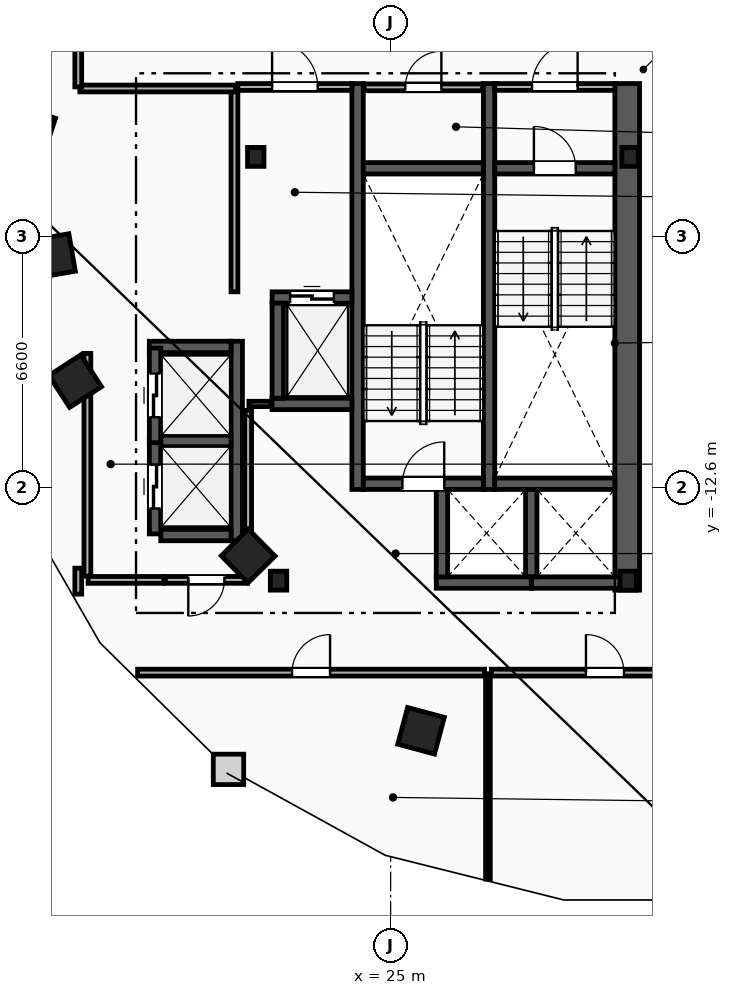
"""IFC4 building model, lengths in metres.
Left out: names, types, materials, properties, quantities, classifications, styles, units other than length and angle.
Written with IfcOpenShell. Run it as: python <this file> out.ifc"""

import sys

from ifc_helpers import new_model, si_unit, direction, frame, frame_2d, origin, origin_2d, place, context, subcontext, project, spatial, rectangle, i_section, extrude, element, fill, save


model = new_model("IFC4")
c1 = context("Model", 3, precision=1e-05, world=origin(), true_north=direction((0.0, 1.0)))
c2 = subcontext(c1, "Body", "Model", "MODEL_VIEW")
j1 = project(units=[si_unit("LENGTHUNIT", "METRE"), si_unit("PLANEANGLEUNIT", "RADIAN")], contexts=[c1])
p1 = place(None, origin())
s1 = spatial("IfcSite", under=j1, at=p1, CompositionType="ELEMENT")
p2 = place(p1, origin())
s2 = spatial("IfcBuilding", under=s1, at=p2, CompositionType="ELEMENT")
p3 = place(p2, frame((0.0, 0.0, 147.6)))
s3 = spatial("IfcBuildingStorey", under=s2, at=p3, CompositionType="ELEMENT", Elevation=147.6)
for number, where, z_axis, x_axis in (
    (1, (31.3, -3.9, 0.0), (0.0, 0.0, 1.0), (1.0, 0.0, 0.0)),
    (2, (21.45, -3.9, 0.0), (0.0, 0.0, 1.0), (1.0, 0.0, 0.0)),
    (3, (22.05, -15.05, 0.0), (0.0, 0.0, 1.0), (1.0, 0.0, 0.0)),
    (4, (31.25, -15.05, 0.0), (0.0, 0.0, 1.0), (1.0, 0.0, 0.0)),
):
    element("IfcColumn", number, at=place(p3, frame(where, z_axis=z_axis, x_axis=x_axis)), inside=s3, PredefinedType="COLUMN", context=c2, shape_type="SweptSolid", body=[
        extrude(i_section(OverallWidth=0.432, OverallDepth=0.498, WebThickness=0.056, FlangeThickness=0.089, FilletRadius=0.018, at=origin_2d()), origin(), (0.0, 0.0, 1.0), 3.6),
    ])
for number, where, z_axis, x_axis in (
    (5, (15.55, -3.2, 0.0), (0.0, 0.0, 1.0), (-0.315, -0.949, 0.0)),
    (6, (16.125, -6.5, 0.0), (0.0, 0.0, 1.0), (0.172, -0.985, 0.0)),
    (7, (16.7, -9.8, 0.0), (0.0, 0.0, 1.0), (0.544, -0.839, 0.0)),
    (8, (21.25, -14.4, 0.0), (0.0, 0.0, 1.0), (0.703, -0.711, 0.0)),
    (9, (25.8, -19.0, 0.0), (0.0, 0.0, 1.0), (0.966, -0.259, 0.0)),
):
    element("IfcColumn", number, at=place(p3, frame(where, z_axis=z_axis, x_axis=x_axis)), inside=s3, PredefinedType="COLUMN", context=c2, shape_type="SweptSolid", body=[
        extrude(rectangle(XDim=1.0, YDim=1.0, at=origin_2d()), origin(), (0.0, 0.0, 1.0), 3.6),
    ])
p4 = place(p3, frame((31.225, -15.3, 0.0), z_axis=(0.0, 0.0, 1.0), x_axis=(0.0, 1.0, 0.0)))
e10 = element("IfcWall", 10, at=p4, inside=s3, PredefinedType="SHEAR", context=c2, shape_type="SweptSolid", body=[
    extrude(rectangle(XDim=13.33, YDim=0.65, at=frame_2d((6.665, 0.0))), origin(), (0.0, 0.0, 1.0), 3.36),
])
for number, where, z_axis, x_axis in (
    (11, (27.59, -12.65, 0.0), (0.0, 0.0, 1.0), (0.0, 1.0, 0.0)),
    (12, (24.13, -12.65, 0.0), (0.0, 0.0, 1.0), (0.0, 1.0, 0.0)),
):
    element("IfcWall", number, at=place(p3, frame(where, z_axis=z_axis, x_axis=x_axis)), inside=s3, PredefinedType="SHEAR", context=c2, shape_type="SweptSolid", body=[
        extrude(rectangle(XDim=10.68, YDim=0.3, at=frame_2d((5.34, 0.0))), origin(), (0.0, 0.0, 1.0), 3.36),
    ])
p5 = place(p3, frame((27.74, -4.2, 0.0), z_axis=(0.0, 0.0, 1.0), x_axis=(1.0, 0.0, 0.0)))
e13 = element("IfcWall", 13, at=p5, inside=s3, PredefinedType="SHEAR", context=c2, shape_type="SweptSolid", body=[
    extrude(rectangle(XDim=3.16, YDim=0.3, at=frame_2d((1.58, 0.0))), origin(), (0.0, 0.0, 1.0), 3.36),
])
p6 = place(p5, frame((1.03, 0.0, 0.0)))
e14 = element("IfcOpeningElement", 14, at=p6, cuts=e13, PredefinedType="OPENING", context=c2, shape_type="SweptSolid", body=[
    extrude(rectangle(XDim=1.1, YDim=2.15, at=frame_2d((0.55, 1.075))), frame((0.0, 0.16, 0.0), z_axis=(0.0, -1.0, 0.0), x_axis=(1.0, 0.0, 0.0)), (0.0, 0.0, 1.0), 0.32),
])
p7 = place(p3, frame((27.74, -12.5, 0.0), z_axis=(0.0, 0.0, 1.0), x_axis=(1.0, 0.0, 0.0)))
e15 = element("IfcWall", 15, at=p7, inside=s3, PredefinedType="SHEAR", context=c2, shape_type="SweptSolid", body=[
    extrude(rectangle(XDim=3.16, YDim=0.3, at=frame_2d((1.58, 0.0))), origin(), (0.0, 0.0, 1.0), 3.36),
])
p8 = place(p3, frame((24.28, -12.5, 0.0), z_axis=(0.0, 0.0, 1.0), x_axis=(1.0, 0.0, 0.0)))
e16 = element("IfcWall", 16, at=p8, inside=s3, PredefinedType="SHEAR", context=c2, shape_type="SweptSolid", body=[
    extrude(rectangle(XDim=3.16, YDim=0.3, at=frame_2d((1.58, 0.0))), origin(), (0.0, 0.0, 1.0), 3.36),
])
p9 = place(p8, frame((1.03, 0.0, 0.0)))
e17 = element("IfcOpeningElement", 17, at=p9, cuts=e16, PredefinedType="OPENING", context=c2, shape_type="SweptSolid", body=[
    extrude(rectangle(XDim=1.1, YDim=2.15, at=frame_2d((0.55, 1.075))), frame((0.0, 0.16, 0.0), z_axis=(0.0, -1.0, 0.0), x_axis=(1.0, 0.0, 0.0)), (0.0, 0.0, 1.0), 0.32),
])
p10 = place(p3, frame((24.28, -4.2, 0.0), z_axis=(0.0, 0.0, 1.0), x_axis=(1.0, 0.0, 0.0)))
e18 = element("IfcWall", 18, at=p10, inside=s3, PredefinedType="SHEAR", context=c2, shape_type="SweptSolid", body=[
    extrude(rectangle(XDim=3.16, YDim=0.3, at=frame_2d((1.58, 0.0))), origin(), (0.0, 0.0, 1.0), 3.36),
])
p11 = place(p3, frame((20.89, -7.45, 0.0), z_axis=(0.0, 0.0, 1.0), x_axis=(0.0, 1.0, 0.0)))
e19 = element("IfcWall", 19, at=p11, inside=s3, PredefinedType="PARTITIONING", context=c2, shape_type="SweptSolid", body=[
    extrude(rectangle(XDim=5.3, YDim=0.18, at=frame_2d((2.65, 0.0))), origin(), (0.0, 0.0, 1.0), 3.36),
])
p12 = place(p3, frame((20.98, -2.06, 0.0), z_axis=(0.0, 0.0, 1.0), x_axis=(1.0, 0.0, 0.0)))
e20 = element("IfcWall", 20, at=p12, inside=s3, PredefinedType="PARTITIONING", context=c2, shape_type="SweptSolid", body=[
    extrude(rectangle(XDim=3.0, YDim=0.18, at=frame_2d((1.5, 0.0))), origin(), (0.0, 0.0, 1.0), 3.36),
])
p13 = place(p12, frame((0.9, 0.0, 0.0)))
e21 = element("IfcOpeningElement", 21, at=p13, cuts=e20, PredefinedType="OPENING", context=c2, shape_type="SweptSolid", body=[
    extrude(rectangle(XDim=1.2, YDim=2.15, at=frame_2d((0.6, 1.075))), frame((0.0, 0.1, 0.0), z_axis=(0.0, -1.0, 0.0), x_axis=(1.0, 0.0, 0.0)), (0.0, 0.0, 1.0), 0.2),
])
p14 = place(p3, frame((27.74, -2.06, 0.0), z_axis=(0.0, 0.0, 1.0), x_axis=(1.0, 0.0, 0.0)))
e22 = element("IfcWall", 22, at=p14, inside=s3, PredefinedType="PARTITIONING", context=c2, shape_type="SweptSolid", body=[
    extrude(rectangle(XDim=3.16, YDim=0.18, at=frame_2d((1.58, 0.0))), origin(), (0.0, 0.0, 1.0), 3.36),
])
p15 = place(p14, frame((0.98, 0.0, 0.0)))
e23 = element("IfcOpeningElement", 23, at=p15, cuts=e22, PredefinedType="OPENING", context=c2, shape_type="SweptSolid", body=[
    extrude(rectangle(XDim=1.2, YDim=2.15, at=frame_2d((0.6, 1.075))), frame((0.0, 0.1, 0.0), z_axis=(0.0, -1.0, 0.0), x_axis=(1.0, 0.0, 0.0)), (0.0, 0.0, 1.0), 0.2),
])
p16 = place(p3, frame((21.88, -7.6, 0.0), z_axis=(0.0, 0.0, 1.0), x_axis=(1.0, 0.0, 0.0)))
e24 = element("IfcWall", 24, at=p16, inside=s3, PredefinedType="SHEAR", context=c2, shape_type="SweptSolid", body=[
    extrude(rectangle(XDim=2.1, YDim=0.3, at=frame_2d((1.05, 0.0))), origin(), (0.0, 0.0, 1.0), 3.36),
])
p17 = place(p16, frame((0.475, 0.0, 0.0)))
e25 = element("IfcOpeningElement", 25, at=p17, cuts=e24, PredefinedType="OPENING", context=c2, shape_type="SweptSolid", body=[
    extrude(rectangle(XDim=1.15, YDim=2.2, at=frame_2d((0.575, 1.1))), frame((0.0, 0.16, 0.0), z_axis=(0.0, -1.0, 0.0), x_axis=(1.0, 0.0, 0.0)), (0.0, 0.0, 1.0), 0.32),
])
p18 = place(p3, frame((21.88, -10.4, 0.0), z_axis=(0.0, 0.0, 1.0), x_axis=(1.0, 0.0, 0.0)))
e26 = element("IfcWall", 26, at=p18, inside=s3, PredefinedType="SHEAR", context=c2, shape_type="SweptSolid", body=[
    extrude(rectangle(XDim=2.1, YDim=0.3, at=frame_2d((1.05, 0.0))), origin(), (0.0, 0.0, 1.0), 3.36),
])
for number, where, z_axis, x_axis in (
    (27, (22.03, -10.25, 0.0), (0.0, 0.0, 1.0), (0.0, 1.0, 0.0)),
    (28, (28.7, -15.1, 0.0), (0.0, 0.0, 1.0), (1.0, 0.0, 0.0)),
):
    element("IfcWall", number, at=place(p3, frame(where, z_axis=z_axis, x_axis=x_axis)), inside=s3, PredefinedType="SHEAR", context=c2, shape_type="SweptSolid", body=[
        extrude(rectangle(XDim=2.5, YDim=0.3, at=frame_2d((1.25, 0.0))), origin(), (0.0, 0.0, 1.0), 3.36),
    ])
p19 = place(p3, frame((28.7, -14.95, 0.0), z_axis=(0.0, 0.0, 1.0), x_axis=(0.0, 1.0, 0.0)))
e29 = element("IfcWall", 29, at=p19, inside=s3, PredefinedType="SHEAR", context=c2, shape_type="SweptSolid", body=[
    extrude(rectangle(XDim=2.3, YDim=0.3, at=frame_2d((1.15, 0.0))), origin(), (0.0, 0.0, 1.0), 3.36),
])
p20 = place(p3, frame((26.2, -15.1, 0.0), z_axis=(0.0, 0.0, 1.0), x_axis=(1.0, 0.0, 0.0)))
e30 = element("IfcWall", 30, at=p20, inside=s3, PredefinedType="SHEAR", context=c2, shape_type="SweptSolid", body=[
    extrude(rectangle(XDim=2.5, YDim=0.3, at=frame_2d((1.25, 0.0))), origin(), (0.0, 0.0, 1.0), 3.36),
])
p21 = place(p3, frame((26.35, -14.95, 0.0), z_axis=(0.0, 0.0, 1.0), x_axis=(0.0, 1.0, 0.0)))
e31 = element("IfcWall", 31, at=p21, inside=s3, PredefinedType="SHEAR", context=c2, shape_type="SweptSolid", body=[
    extrude(rectangle(XDim=2.3, YDim=0.3, at=frame_2d((1.15, 0.0))), origin(), (0.0, 0.0, 1.0), 3.36),
])
p22 = place(p3, frame((20.95, -14.0, 0.0), z_axis=(0.0, 0.0, 1.0), x_axis=(0.0, 1.0, 0.0)))
e32 = element("IfcWall", 32, at=p22, inside=s3, PredefinedType="SHEAR", context=c2, shape_type="SweptSolid", body=[
    extrude(rectangle(XDim=5.25, YDim=0.3, at=frame_2d((2.625, 0.0))), origin(), (0.0, 0.0, 1.0), 3.36),
])
p23 = place(p3, frame((18.95, -13.85, 0.0), z_axis=(0.0, 0.0, 1.0), x_axis=(1.0, 0.0, 0.0)))
e33 = element("IfcWall", 33, at=p23, inside=s3, PredefinedType="SHEAR", context=c2, shape_type="SweptSolid", body=[
    extrude(rectangle(XDim=1.85, YDim=0.3, at=frame_2d((0.925, 0.0))), origin(), (0.0, 0.0, 1.0), 3.36),
])
p24 = place(p3, frame((18.65, -8.9, 0.0), z_axis=(0.0, 0.0, 1.0), x_axis=(1.0, 0.0, 0.0)))
e34 = element("IfcWall", 34, at=p24, inside=s3, PredefinedType="SHEAR", context=c2, shape_type="SweptSolid", body=[
    extrude(rectangle(XDim=2.15, YDim=0.3, at=frame_2d((1.075, 0.0))), origin(), (0.0, 0.0, 1.0), 3.36),
])
p25 = place(p3, frame((18.95, -11.375, 0.0), z_axis=(0.0, 0.0, 1.0), x_axis=(1.0, 0.0, 0.0)))
e35 = element("IfcWall", 35, at=p25, inside=s3, PredefinedType="SHEAR", context=c2, shape_type="SweptSolid", body=[
    extrude(rectangle(XDim=1.85, YDim=0.3, at=frame_2d((0.925, 0.0))), origin(), (0.0, 0.0, 1.0), 3.36),
])
p26 = place(p3, frame((18.8, -13.82, 0.0), z_axis=(0.0, 0.0, 1.0), x_axis=(0.0, 1.0, 0.0)))
e36 = element("IfcWall", 36, at=p26, inside=s3, PredefinedType="SHEAR", context=c2, shape_type="SweptSolid", body=[
    extrude(rectangle(XDim=2.49, YDim=0.3, at=frame_2d((1.245, 0.0))), origin(), (0.0, 0.0, 1.0), 3.36),
])
p27 = place(p26, frame((0.67, 0.0, 0.0)))
e37 = element("IfcOpeningElement", 37, at=p27, cuts=e36, PredefinedType="OPENING", context=c2, shape_type="SweptSolid", body=[
    extrude(rectangle(XDim=1.15, YDim=2.2, at=frame_2d((0.575, 1.1))), frame((0.0, 0.16, 0.0), z_axis=(0.0, -1.0, 0.0), x_axis=(1.0, 0.0, 0.0)), (0.0, 0.0, 1.0), 0.32),
])
p28 = place(p3, frame((18.8, -11.42, 0.0), z_axis=(0.0, 0.0, 1.0), x_axis=(0.0, 1.0, 0.0)))
e38 = element("IfcWall", 38, at=p28, inside=s3, PredefinedType="SHEAR", context=c2, shape_type="SweptSolid", body=[
    extrude(rectangle(XDim=2.49, YDim=0.3, at=frame_2d((1.245, 0.0))), origin(), (0.0, 0.0, 1.0), 3.36),
])
p29 = place(p28, frame((0.67, 0.0, 0.0)))
e39 = element("IfcOpeningElement", 39, at=p29, cuts=e38, PredefinedType="OPENING", context=c2, shape_type="SweptSolid", body=[
    extrude(rectangle(XDim=1.15, YDim=2.2, at=frame_2d((0.575, 1.1))), frame((0.0, 0.16, 0.0), z_axis=(0.0, -1.0, 0.0), x_axis=(1.0, 0.0, 0.0)), (0.0, 0.0, 1.0), 0.32),
])
p30 = place(p3, frame((17.02, -14.93, 0.0), z_axis=(0.0, 0.0, 1.0), x_axis=(0.0, 1.0, 0.0)))
e40 = element("IfcWall", 40, at=p30, inside=s3, PredefinedType="PARTITIONING", context=c2, shape_type="SweptSolid", body=[
    extrude(rectangle(XDim=5.86, YDim=0.18, at=frame_2d((2.93, 0.0))), origin(), (0.0, 0.0, 1.0), 3.36),
])
p31 = place(p3, frame((17.04, -15.03, 0.0), z_axis=(0.0, 0.0, 1.0), x_axis=(1.0, 0.0, 0.0)))
e41 = element("IfcWall", 41, at=p31, inside=s3, PredefinedType="PARTITIONING", context=c2, shape_type="SweptSolid", body=[
    extrude(rectangle(XDim=1.99, YDim=0.18, at=frame_2d((0.995, 0.0))), origin(), (0.0, 0.0, 1.0), 3.36),
])
p32 = place(p3, frame((21.23, -15.03, 0.0), z_axis=(0.0, 0.0, 1.0), x_axis=(-1.0, 0.0, 0.0)))
e42 = element("IfcWall", 42, at=p32, inside=s3, PredefinedType="PARTITIONING", context=c2, shape_type="SweptSolid", body=[
    extrude(rectangle(XDim=2.16, YDim=0.18, at=frame_2d((1.08, 0.0))), origin(), (0.0, 0.0, 1.0), 3.36),
])
p33 = place(p32, frame((0.605, 0.0, 0.0)))
e43 = element("IfcOpeningElement", 43, at=p33, cuts=e42, PredefinedType="OPENING", context=c2, shape_type="SweptSolid", body=[
    extrude(rectangle(XDim=0.95, YDim=2.1, at=frame_2d((0.475, 1.05))), frame((0.0, 0.1, 0.0), z_axis=(0.0, -1.0, 0.0), x_axis=(1.0, 0.0, 0.0)), (0.0, 0.0, 1.0), 0.2),
])
p34 = place(p3, frame((21.27, -10.4, 0.0), z_axis=(0.0, 0.0, 1.0), x_axis=(1.0, 0.0, 0.0)))
e44 = element("IfcWall", 44, at=p34, inside=s3, PredefinedType="PARTITIONING", context=c2, shape_type="SweptSolid", body=[
    extrude(rectangle(XDim=0.59, YDim=0.14, at=frame_2d((0.295, 0.0))), origin(), (0.0, 0.0, 1.0), 3.36),
])
p35 = place(p3, frame((21.25, -14.93, 0.0), z_axis=(0.0, 0.0, 1.0), x_axis=(0.0, 1.0, 0.0)))
e45 = element("IfcWall", 45, at=p35, inside=s3, PredefinedType="PARTITIONING", context=c2, shape_type="SweptSolid", body=[
    extrude(rectangle(XDim=4.36, YDim=0.18, at=frame_2d((2.18, 0.0))), origin(), (0.0, 0.0, 1.0), 3.36),
])
p36 = place(p3, frame((24.3, -2.07, 0.0), z_axis=(0.0, 0.0, 1.0), x_axis=(1.0, 0.0, 0.0)))
e46 = element("IfcWall", 46, at=p36, inside=s3, PredefinedType="PARTITIONING", context=c2, shape_type="SweptSolid", body=[
    extrude(rectangle(XDim=3.12, YDim=0.18, at=frame_2d((1.56, 0.0))), origin(), (0.0, 0.0, 1.0), 3.36),
])
p37 = place(p36, frame((1.085, 0.0, 0.0)))
e47 = element("IfcOpeningElement", 47, at=p37, cuts=e46, PredefinedType="OPENING", context=c2, shape_type="SweptSolid", body=[
    extrude(rectangle(XDim=0.95, YDim=2.1, at=frame_2d((0.475, 1.05))), frame((0.0, 0.1, 0.0), z_axis=(0.0, -1.0, 0.0), x_axis=(1.0, 0.0, 0.0)), (0.0, 0.0, 1.0), 0.2),
])
p38 = place(p3, frame((27.56, -22.901, 0.0), z_axis=(0.0, 0.0, 1.0), x_axis=(0.0, 1.0, 0.0)))
e48 = element("IfcWall", 48, at=p38, inside=s3, PredefinedType="PARTITIONING", context=c2, shape_type="SweptSolid", body=[
    extrude(rectangle(XDim=5.401, YDim=0.125, at=frame_2d((2.701, 0.0))), origin(), (0.0, 0.0, 1.0), 3.36),
])
p39 = place(p3, frame((18.342, -17.47, 0.0), z_axis=(0.0, 0.0, 1.0), x_axis=(1.0, 0.0, 0.0)))
e49 = element("IfcWall", 49, at=p39, inside=s3, PredefinedType="PARTITIONING", context=c2, shape_type="SweptSolid", body=[
    extrude(rectangle(XDim=9.128, YDim=0.18, at=frame_2d((4.564, 0.0))), origin(), (0.0, 0.0, 1.0), 3.36),
])
p40 = place(p39, frame((4.064, 0.0, 0.0)))
e50 = element("IfcOpeningElement", 50, at=p40, cuts=e49, PredefinedType="OPENING", context=c2, shape_type="SweptSolid", body=[
    extrude(rectangle(XDim=1.0, YDim=2.15, at=frame_2d((0.5, 1.075))), frame((0.0, 0.1, 0.0), z_axis=(0.0, -1.0, 0.0), x_axis=(1.0, 0.0, 0.0)), (0.0, 0.0, 1.0), 0.2),
])
p41 = place(p3, frame((27.65, -17.47, 0.0), z_axis=(0.0, 0.0, 1.0), x_axis=(1.0, 0.0, 0.0)))
e51 = element("IfcWall", 51, at=p41, inside=s3, PredefinedType="PARTITIONING", context=c2, shape_type="SweptSolid", body=[
    extrude(rectangle(XDim=5.979, YDim=0.18, at=frame_2d((2.989, 0.0))), origin(), (0.0, 0.0, 1.0), 3.36),
])
p42 = place(p41, frame((2.489, 0.0, 0.0)))
e52 = element("IfcOpeningElement", 52, at=p42, cuts=e51, PredefinedType="OPENING", context=c2, shape_type="SweptSolid", body=[
    extrude(rectangle(XDim=1.0, YDim=2.15, at=frame_2d((0.5, 1.075))), frame((0.0, 0.1, 0.0), z_axis=(0.0, -1.0, 0.0), x_axis=(1.0, 0.0, 0.0)), (0.0, 0.0, 1.0), 0.2),
])
p43 = place(p3, frame((16.822, -2.1, 0.0), z_axis=(0.0, 0.0, 1.0), x_axis=(1.0, 0.0, 0.0)))
e53 = element("IfcWall", 53, at=p43, inside=s3, PredefinedType="PARTITIONING", context=c2, shape_type="SweptSolid", body=[
    extrude(rectangle(XDim=4.098, YDim=0.18, at=frame_2d((2.049, 0.0))), origin(), (0.0, 0.0, 1.0), 3.36),
])
p44 = place(p3, frame((16.78, 0.329, 0.0), z_axis=(0.0, 0.0, 1.0), x_axis=(0.0, -1.0, 0.0)))
e54 = element("IfcWall", 54, at=p44, inside=s3, PredefinedType="PARTITIONING", context=c2, shape_type="SweptSolid", body=[
    extrude(rectangle(XDim=2.387, YDim=0.18, at=frame_2d((1.194, 0.0))), origin(), (0.0, 0.0, 1.0), 3.36),
])
p45 = place(p3, frame((16.78, -14.721, 0.0), z_axis=(0.0, 0.0, 1.0), x_axis=(0.0, -1.0, 0.0)))
e55 = element("IfcWall", 55, at=p45, inside=s3, PredefinedType="PARTITIONING", context=c2, shape_type="SweptSolid", body=[
    extrude(rectangle(XDim=0.684, YDim=0.18, at=frame_2d((0.342, 0.0))), origin(), (0.0, 0.0, 1.0), 3.36),
])
p46 = place(p6, origin())
e56 = element("IfcDoor", 56, at=p46, inside=s3, OperationType="SINGLE_SWING_LEFT", PredefinedType="DOOR", context=c2, shape_type="SweptSolid", body=[
    extrude(rectangle(XDim=1.1, YDim=2.15, at=frame_2d((0.55, 1.075))), frame((0.0, 0.025, 0.0), z_axis=(0.0, -1.0, 0.0), x_axis=(1.0, 0.0, 0.0)), (0.0, 0.0, 1.0), 0.05),
])
fill(e14, e56)
p47 = place(p9, origin())
e57 = element("IfcDoor", 57, at=p47, inside=s3, OperationType="SINGLE_SWING_RIGHT", PredefinedType="DOOR", context=c2, shape_type="SweptSolid", body=[
    extrude(rectangle(XDim=1.1, YDim=2.15, at=frame_2d((0.55, 1.075))), frame((0.0, 0.025, 0.0), z_axis=(0.0, -1.0, 0.0), x_axis=(1.0, 0.0, 0.0)), (0.0, 0.0, 1.0), 0.05),
])
fill(e17, e57)
p48 = place(p13, origin())
e58 = element("IfcDoor", 58, at=p48, inside=s3, OperationType="SINGLE_SWING_LEFT", PredefinedType="DOOR", context=c2, shape_type="SweptSolid", body=[
    extrude(rectangle(XDim=1.2, YDim=2.15, at=frame_2d((0.6, 1.075))), frame((0.0, 0.025, 0.0), z_axis=(0.0, -1.0, 0.0), x_axis=(1.0, 0.0, 0.0)), (0.0, 0.0, 1.0), 0.05),
])
fill(e21, e58)
p49 = place(p15, origin())
e59 = element("IfcDoor", 59, at=p49, inside=s3, OperationType="SINGLE_SWING_RIGHT", PredefinedType="DOOR", context=c2, shape_type="SweptSolid", body=[
    extrude(rectangle(XDim=1.2, YDim=2.15, at=frame_2d((0.6, 1.075))), frame((0.0, 0.025, 0.0), z_axis=(0.0, -1.0, 0.0), x_axis=(1.0, 0.0, 0.0)), (0.0, 0.0, 1.0), 0.05),
])
fill(e23, e59)
p50 = place(p17, origin())
e60 = element("IfcDoor", 60, at=p50, inside=s3, OperationType="SLIDING_TO_LEFT", PredefinedType="TRAPDOOR", context=c2, shape_type="SweptSolid", body=[
    extrude(rectangle(XDim=1.15, YDim=2.2, at=frame_2d((0.575, 1.1))), frame((0.0, 0.025, 0.0), z_axis=(0.0, -1.0, 0.0), x_axis=(1.0, 0.0, 0.0)), (0.0, 0.0, 1.0), 0.05),
])
fill(e25, e60)
p51 = place(p27, origin())
e61 = element("IfcDoor", 61, at=p51, inside=s3, OperationType="SLIDING_TO_LEFT", PredefinedType="TRAPDOOR", context=c2, shape_type="SweptSolid", body=[
    extrude(rectangle(XDim=1.15, YDim=2.2, at=frame_2d((0.575, 1.1))), frame((0.0, 0.025, 0.0), z_axis=(0.0, -1.0, 0.0), x_axis=(1.0, 0.0, 0.0)), (0.0, 0.0, 1.0), 0.05),
])
fill(e37, e61)
p52 = place(p29, origin())
e62 = element("IfcDoor", 62, at=p52, inside=s3, OperationType="SLIDING_TO_LEFT", PredefinedType="TRAPDOOR", context=c2, shape_type="SweptSolid", body=[
    extrude(rectangle(XDim=1.15, YDim=2.2, at=frame_2d((0.575, 1.1))), frame((0.0, 0.025, 0.0), z_axis=(0.0, -1.0, 0.0), x_axis=(1.0, 0.0, 0.0)), (0.0, 0.0, 1.0), 0.05),
])
fill(e39, e62)
p53 = place(p40, origin())
e63 = element("IfcDoor", 63, at=p53, inside=s3, OperationType="SINGLE_SWING_RIGHT", PredefinedType="DOOR", context=c2, shape_type="SweptSolid", body=[
    extrude(rectangle(XDim=1.0, YDim=2.15, at=frame_2d((0.5, 1.075))), frame((0.0, 0.025, 0.0), z_axis=(0.0, -1.0, 0.0), x_axis=(1.0, 0.0, 0.0)), (0.0, 0.0, 1.0), 0.05),
])
fill(e50, e63)
p54 = place(p42, origin())
e64 = element("IfcDoor", 64, at=p54, inside=s3, OperationType="SINGLE_SWING_LEFT", PredefinedType="DOOR", context=c2, shape_type="SweptSolid", body=[
    extrude(rectangle(XDim=1.0, YDim=2.15, at=frame_2d((0.5, 1.075))), frame((0.0, 0.025, 0.0), z_axis=(0.0, -1.0, 0.0), x_axis=(1.0, 0.0, 0.0)), (0.0, 0.0, 1.0), 0.05),
])
fill(e52, e64)
p55 = place(p37, origin())
e65 = element("IfcDoor", 65, at=p55, inside=s3, OperationType="SINGLE_SWING_RIGHT", PredefinedType="DOOR", context=c2, shape_type="SweptSolid", body=[
    extrude(rectangle(XDim=0.95, YDim=2.1, at=frame_2d((0.475, 1.05))), frame((0.0, 0.025, 0.0), z_axis=(0.0, -1.0, 0.0), x_axis=(1.0, 0.0, 0.0)), (0.0, 0.0, 1.0), 0.05),
])
fill(e47, e65)
p56 = place(p33, origin())
e66 = element("IfcDoor", 66, at=p56, inside=s3, OperationType="SINGLE_SWING_RIGHT", PredefinedType="DOOR", context=c2, shape_type="SweptSolid", body=[
    extrude(rectangle(XDim=0.95, YDim=2.1, at=frame_2d((0.475, 1.05))), frame((0.0, 0.025, 0.0), z_axis=(0.0, -1.0, 0.0), x_axis=(1.0, 0.0, 0.0)), (0.0, 0.0, 1.0), 0.05),
])
fill(e43, e66)
save(model, sys.argv[1])
